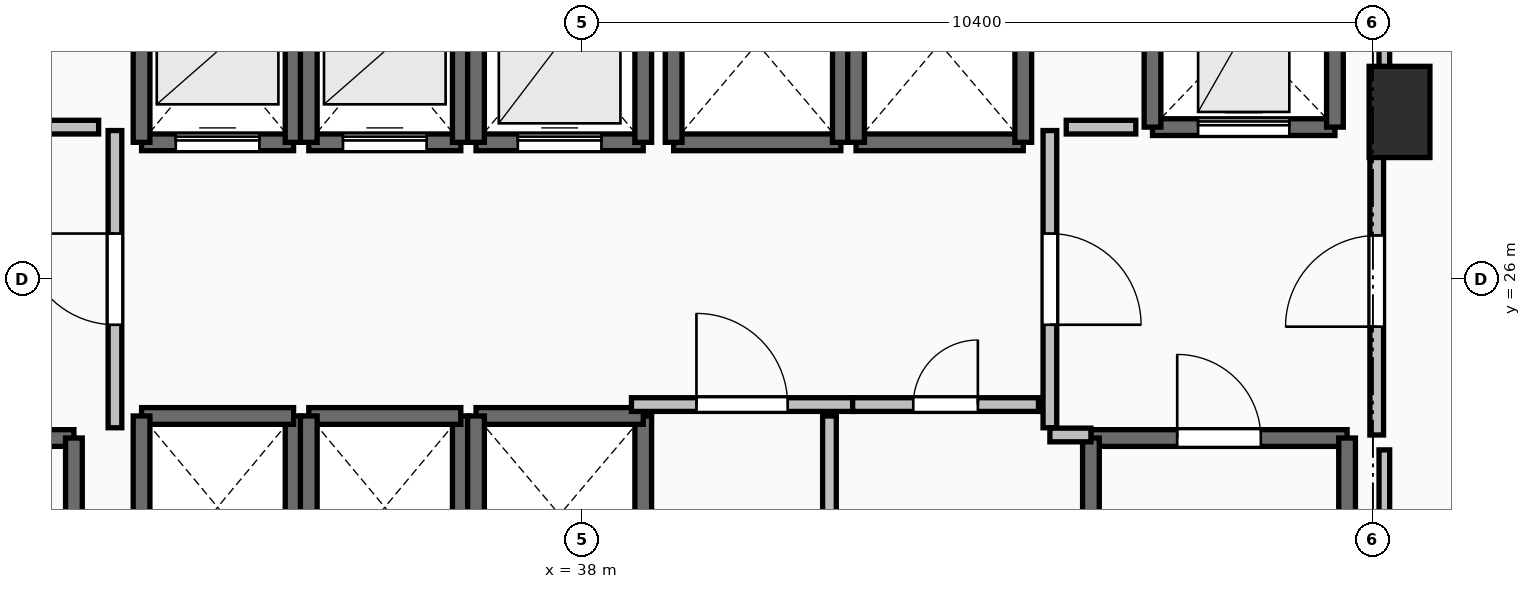
"""IFC4 building model, lengths in metres.
Left out: names, types, materials, properties, quantities, classifications, styles, units other than length and angle.
Written with IfcOpenShell. Run it as: python <this file> out.ifc"""

import sys

from ifc_helpers import new_model, si_unit, direction, frame, frame_2d, origin, origin_2d, place, context, subcontext, project, spatial, rectangle, extrude, element, fill, save


model = new_model("IFC4")
c1 = context("Model", 3, precision=1e-05, world=origin(), true_north=direction((0.0, 1.0)))
c2 = subcontext(c1, "Body", "Model", "MODEL_VIEW")
j1 = project(units=[si_unit("LENGTHUNIT", "METRE"), si_unit("PLANEANGLEUNIT", "RADIAN")], contexts=[c1])
p1 = place(None, origin())
s1 = spatial("IfcSite", under=j1, at=p1, CompositionType="ELEMENT")
p2 = place(p1, origin())
s2 = spatial("IfcBuilding", under=s1, at=p2, CompositionType="ELEMENT")
p3 = place(p2, frame((0.0, 0.0, 62.5)))
s3 = spatial("IfcBuildingStorey", under=s2, at=p3, CompositionType="ELEMENT", Elevation=62.5)
p4 = place(p3, frame((48.75, 28.2, 0.0), z_axis=(0.0, 0.0, 1.0), x_axis=(1.0, 0.0, 0.0)))
e1 = element("IfcColumn", 1, at=p4, inside=s3, PredefinedType="PILASTER", context=c2, shape_type="SweptSolid", body=[
    extrude(rectangle(XDim=0.8, YDim=1.2, at=origin_2d()), origin(), (0.0, 0.0, 1.0), 3.5),
])
p5 = place(p3, frame((27.94, 23.91, 0.0), z_axis=(0.0, 0.0, 1.0), x_axis=(1.0, 0.0, 0.0)))
e2 = element("IfcWall", 2, at=p5, inside=s3, PredefinedType="SOLIDWALL", context=c2, shape_type="SweptSolid", body=[
    extrude(rectangle(XDim=3.37, YDim=0.22, at=frame_2d((1.685, 0.0))), origin(), (0.0, 0.0, 1.0), 3.24),
])
p6 = place(p5, frame((1.135, 0.0, 0.0)))
e3 = element("IfcOpeningElement", 3, at=p6, cuts=e2, PredefinedType="OPENING", context=c2, shape_type="SweptSolid", body=[
    extrude(rectangle(XDim=1.1, YDim=2.15, at=frame_2d((0.55, 1.075))), frame((0.0, 0.125, 0.0), z_axis=(0.0, -1.0, 0.0), x_axis=(1.0, 0.0, 0.0)), (0.0, 0.0, 1.0), 0.25),
])
p7 = place(p3, frame((31.31, 23.91, 0.0), z_axis=(0.0, 0.0, 1.0), x_axis=(0.0, -1.0, 0.0)))
e4 = element("IfcWall", 4, at=p7, inside=s3, PredefinedType="SOLIDWALL", context=c2, shape_type="SweptSolid", body=[
    extrude(rectangle(XDim=7.42, YDim=0.22, at=frame_2d((3.71, 0.0))), origin(), (0.0, 0.0, 1.0), 3.24),
])
p8 = place(p3, frame((44.69, 23.91, 0.0), z_axis=(0.0, 0.0, 1.0), x_axis=(1.0, 0.0, 0.0)))
e5 = element("IfcWall", 5, at=p8, inside=s3, PredefinedType="SOLIDWALL", context=c2, shape_type="SweptSolid", body=[
    extrude(rectangle(XDim=3.37, YDim=0.22, at=frame_2d((1.685, 0.0))), origin(), (0.0, 0.0, 1.0), 3.24),
])
p9 = place(p8, frame((1.135, 0.0, 0.0)))
e6 = element("IfcOpeningElement", 6, at=p9, cuts=e5, PredefinedType="OPENING", context=c2, shape_type="SweptSolid", body=[
    extrude(rectangle(XDim=1.1, YDim=2.15, at=frame_2d((0.55, 1.075))), frame((0.0, 0.125, 0.0), z_axis=(0.0, -1.0, 0.0), x_axis=(1.0, 0.0, 0.0)), (0.0, 0.0, 1.0), 0.25),
])
for number, where, z_axis, x_axis in (
    (7, (48.06, 23.91, 0.0), (0.0, 0.0, 1.0), (0.0, -1.0, 0.0)),
    (8, (44.69, 16.49, 0.0), (0.0, 0.0, 1.0), (0.0, 1.0, 0.0)),
):
    element("IfcWall", number, at=place(p3, frame(where, z_axis=z_axis, x_axis=x_axis)), inside=s3, PredefinedType="SOLIDWALL", context=c2, shape_type="SweptSolid", body=[
        extrude(rectangle(XDim=7.42, YDim=0.22, at=frame_2d((3.71, 0.0))), origin(), (0.0, 0.0, 1.0), 3.24),
    ])
p10 = place(p3, frame((32.2, 27.8, 0.0), z_axis=(0.0, 0.0, 1.0), x_axis=(1.0, 0.0, 0.0)))
e9 = element("IfcWall", 9, at=p10, inside=s3, PredefinedType="SOLIDWALL", context=c2, shape_type="SweptSolid", body=[
    extrude(rectangle(XDim=2.0, YDim=0.22, at=frame_2d((1.0, 0.0))), origin(), (0.0, 0.0, 1.0), 3.24),
])
p11 = place(p10, frame((0.45, 0.0, 0.0)))
e10 = element("IfcOpeningElement", 10, at=p11, cuts=e9, PredefinedType="OPENING", context=c2, shape_type="SweptSolid", body=[
    extrude(rectangle(XDim=1.1, YDim=2.2, at=frame_2d((0.55, 1.1))), frame((0.0, 0.125, 0.0), z_axis=(0.0, -1.0, 0.0), x_axis=(1.0, 0.0, 0.0)), (0.0, 0.0, 1.0), 0.25),
])
for number, where, z_axis, x_axis in (
    (11, (34.2, 27.8, 0.0), (0.0, 0.0, 1.0), (0.0, 1.0, 0.0)),
    (12, (32.2, 30.2, 0.0), (0.0, 0.0, 1.0), (0.0, -1.0, 0.0)),
):
    element("IfcWall", number, at=place(p3, frame(where, z_axis=z_axis, x_axis=x_axis)), inside=s3, PredefinedType="SOLIDWALL", context=c2, shape_type="SweptSolid", body=[
        extrude(rectangle(XDim=2.4, YDim=0.22, at=frame_2d((1.2, 0.0))), origin(), (0.0, 0.0, 1.0), 3.24),
    ])
p12 = place(p3, frame((34.4, 27.8, 0.0), z_axis=(0.0, 0.0, 1.0), x_axis=(1.0, 0.0, 0.0)))
e13 = element("IfcWall", 13, at=p12, inside=s3, PredefinedType="SOLIDWALL", context=c2, shape_type="SweptSolid", body=[
    extrude(rectangle(XDim=2.0, YDim=0.22, at=frame_2d((1.0, 0.0))), origin(), (0.0, 0.0, 1.0), 3.24),
])
p13 = place(p12, frame((0.45, 0.0, 0.0)))
e14 = element("IfcOpeningElement", 14, at=p13, cuts=e13, PredefinedType="OPENING", context=c2, shape_type="SweptSolid", body=[
    extrude(rectangle(XDim=1.1, YDim=2.2, at=frame_2d((0.55, 1.1))), frame((0.0, 0.125, 0.0), z_axis=(0.0, -1.0, 0.0), x_axis=(1.0, 0.0, 0.0)), (0.0, 0.0, 1.0), 0.25),
])
for number, where, z_axis, x_axis in (
    (15, (36.4, 27.8, 0.0), (0.0, 0.0, 1.0), (0.0, 1.0, 0.0)),
    (16, (34.4, 30.2, 0.0), (0.0, 0.0, 1.0), (0.0, -1.0, 0.0)),
):
    element("IfcWall", number, at=place(p3, frame(where, z_axis=z_axis, x_axis=x_axis)), inside=s3, PredefinedType="SOLIDWALL", context=c2, shape_type="SweptSolid", body=[
        extrude(rectangle(XDim=2.4, YDim=0.22, at=frame_2d((1.2, 0.0))), origin(), (0.0, 0.0, 1.0), 3.24),
    ])
p14 = place(p3, frame((36.6, 27.8, 0.0), z_axis=(0.0, 0.0, 1.0), x_axis=(1.0, 0.0, 0.0)))
e17 = element("IfcWall", 17, at=p14, inside=s3, PredefinedType="SOLIDWALL", context=c2, shape_type="SweptSolid", body=[
    extrude(rectangle(XDim=2.2, YDim=0.22, at=frame_2d((1.1, 0.0))), origin(), (0.0, 0.0, 1.0), 3.24),
])
p15 = place(p14, frame((0.55, 0.0, 0.0)))
e18 = element("IfcOpeningElement", 18, at=p15, cuts=e17, PredefinedType="OPENING", context=c2, shape_type="SweptSolid", body=[
    extrude(rectangle(XDim=1.1, YDim=2.2, at=frame_2d((0.55, 1.1))), frame((0.0, 0.125, 0.0), z_axis=(0.0, -1.0, 0.0), x_axis=(1.0, 0.0, 0.0)), (0.0, 0.0, 1.0), 0.25),
])
for number, where, z_axis, x_axis in (
    (19, (38.8, 27.8, 0.0), (0.0, 0.0, 1.0), (0.0, 1.0, 0.0)),
    (20, (36.6, 30.4, 0.0), (0.0, 0.0, 1.0), (0.0, -1.0, 0.0)),
):
    element("IfcWall", number, at=place(p3, frame(where, z_axis=z_axis, x_axis=x_axis)), inside=s3, PredefinedType="SOLIDWALL", context=c2, shape_type="SweptSolid", body=[
        extrude(rectangle(XDim=2.6, YDim=0.22, at=frame_2d((1.3, 0.0))), origin(), (0.0, 0.0, 1.0), 3.24),
    ])
p16 = place(p3, frame((34.2, 21.8, 0.0), z_axis=(0.0, 0.0, 1.0), x_axis=(0.0, 1.0, 0.0)))
e21 = element("IfcWall", 21, at=p16, inside=s3, PredefinedType="SOLIDWALL", context=c2, shape_type="SweptSolid", body=[
    extrude(rectangle(XDim=2.4, YDim=0.22, at=frame_2d((1.2, 0.0))), origin(), (0.0, 0.0, 1.0), 3.24),
])
p17 = place(p3, frame((34.2, 24.2, 0.0), z_axis=(0.0, 0.0, 1.0), x_axis=(-1.0, 0.0, 0.0)))
e22 = element("IfcWall", 22, at=p17, inside=s3, PredefinedType="SOLIDWALL", context=c2, shape_type="SweptSolid", body=[
    extrude(rectangle(XDim=2.0, YDim=0.22, at=frame_2d((1.0, 0.0))), origin(), (0.0, 0.0, 1.0), 3.24),
])
for number, where, z_axis, x_axis in (
    (23, (32.2, 24.2, 0.0), (0.0, 0.0, 1.0), (0.0, -1.0, 0.0)),
    (24, (36.4, 21.8, 0.0), (0.0, 0.0, 1.0), (0.0, 1.0, 0.0)),
):
    element("IfcWall", number, at=place(p3, frame(where, z_axis=z_axis, x_axis=x_axis)), inside=s3, PredefinedType="SOLIDWALL", context=c2, shape_type="SweptSolid", body=[
        extrude(rectangle(XDim=2.4, YDim=0.22, at=frame_2d((1.2, 0.0))), origin(), (0.0, 0.0, 1.0), 3.24),
    ])
p18 = place(p3, frame((36.4, 24.2, 0.0), z_axis=(0.0, 0.0, 1.0), x_axis=(-1.0, 0.0, 0.0)))
e25 = element("IfcWall", 25, at=p18, inside=s3, PredefinedType="SOLIDWALL", context=c2, shape_type="SweptSolid", body=[
    extrude(rectangle(XDim=2.0, YDim=0.22, at=frame_2d((1.0, 0.0))), origin(), (0.0, 0.0, 1.0), 3.24),
])
p19 = place(p3, frame((34.4, 24.2, 0.0), z_axis=(0.0, 0.0, 1.0), x_axis=(0.0, -1.0, 0.0)))
e26 = element("IfcWall", 26, at=p19, inside=s3, PredefinedType="SOLIDWALL", context=c2, shape_type="SweptSolid", body=[
    extrude(rectangle(XDim=2.4, YDim=0.22, at=frame_2d((1.2, 0.0))), origin(), (0.0, 0.0, 1.0), 3.24),
])
p20 = place(p3, frame((38.8, 21.6, 0.0), z_axis=(0.0, 0.0, 1.0), x_axis=(0.0, 1.0, 0.0)))
e27 = element("IfcWall", 27, at=p20, inside=s3, PredefinedType="SOLIDWALL", context=c2, shape_type="SweptSolid", body=[
    extrude(rectangle(XDim=2.6, YDim=0.22, at=frame_2d((1.3, 0.0))), origin(), (0.0, 0.0, 1.0), 3.24),
])
p21 = place(p3, frame((38.8, 24.2, 0.0), z_axis=(0.0, 0.0, 1.0), x_axis=(-1.0, 0.0, 0.0)))
e28 = element("IfcWall", 28, at=p21, inside=s3, PredefinedType="SOLIDWALL", context=c2, shape_type="SweptSolid", body=[
    extrude(rectangle(XDim=2.2, YDim=0.22, at=frame_2d((1.1, 0.0))), origin(), (0.0, 0.0, 1.0), 3.24),
])
p22 = place(p3, frame((36.6, 24.2, 0.0), z_axis=(0.0, 0.0, 1.0), x_axis=(0.0, -1.0, 0.0)))
e29 = element("IfcWall", 29, at=p22, inside=s3, PredefinedType="SOLIDWALL", context=c2, shape_type="SweptSolid", body=[
    extrude(rectangle(XDim=2.6, YDim=0.22, at=frame_2d((1.3, 0.0))), origin(), (0.0, 0.0, 1.0), 3.24),
])
p23 = place(p3, frame((39.2, 27.8, 0.0), z_axis=(0.0, 0.0, 1.0), x_axis=(1.0, 0.0, 0.0)))
e30 = element("IfcWall", 30, at=p23, inside=s3, PredefinedType="SOLIDWALL", context=c2, shape_type="SweptSolid", body=[
    extrude(rectangle(XDim=2.2, YDim=0.22, at=frame_2d((1.1, 0.0))), origin(), (0.0, 0.0, 1.0), 3.24),
])
for number, where, z_axis, x_axis in (
    (31, (41.4, 27.8, 0.0), (0.0, 0.0, 1.0), (0.0, 1.0, 0.0)),
    (32, (39.2, 30.4, 0.0), (0.0, 0.0, 1.0), (0.0, -1.0, 0.0)),
):
    element("IfcWall", number, at=place(p3, frame(where, z_axis=z_axis, x_axis=x_axis)), inside=s3, PredefinedType="SOLIDWALL", context=c2, shape_type="SweptSolid", body=[
        extrude(rectangle(XDim=2.6, YDim=0.22, at=frame_2d((1.3, 0.0))), origin(), (0.0, 0.0, 1.0), 3.24),
    ])
p24 = place(p3, frame((41.6, 27.8, 0.0), z_axis=(0.0, 0.0, 1.0), x_axis=(1.0, 0.0, 0.0)))
e33 = element("IfcWall", 33, at=p24, inside=s3, PredefinedType="SOLIDWALL", context=c2, shape_type="SweptSolid", body=[
    extrude(rectangle(XDim=2.2, YDim=0.22, at=frame_2d((1.1, 0.0))), origin(), (0.0, 0.0, 1.0), 3.24),
])
for number, where, z_axis, x_axis in (
    (34, (43.8, 27.8, 0.0), (0.0, 0.0, 1.0), (0.0, 1.0, 0.0)),
    (35, (41.6, 30.4, 0.0), (0.0, 0.0, 1.0), (0.0, -1.0, 0.0)),
):
    element("IfcWall", number, at=place(p3, frame(where, z_axis=z_axis, x_axis=x_axis)), inside=s3, PredefinedType="SOLIDWALL", context=c2, shape_type="SweptSolid", body=[
        extrude(rectangle(XDim=2.6, YDim=0.22, at=frame_2d((1.3, 0.0))), origin(), (0.0, 0.0, 1.0), 3.24),
    ])
p25 = place(p3, frame((45.5, 28.0, 0.0), z_axis=(0.0, 0.0, 1.0), x_axis=(1.0, 0.0, 0.0)))
e36 = element("IfcWall", 36, at=p25, inside=s3, PredefinedType="SHEAR", context=c2, shape_type="SweptSolid", body=[
    extrude(rectangle(XDim=2.4, YDim=0.22, at=frame_2d((1.2, 0.0))), origin(), (0.0, 0.0, 1.0), 3.24),
])
p26 = place(p25, frame((0.6, 0.0, 0.0)))
e37 = element("IfcOpeningElement", 37, at=p26, cuts=e36, PredefinedType="OPENING", context=c2, shape_type="SweptSolid", body=[
    extrude(rectangle(XDim=1.2, YDim=2.2, at=frame_2d((0.6, 1.1))), frame((0.0, 0.125, 0.0), z_axis=(0.0, -1.0, 0.0), x_axis=(1.0, 0.0, 0.0)), (0.0, 0.0, 1.0), 0.25),
])
for number, where, z_axis, x_axis in (
    (38, (47.9, 28.0, 0.0), (0.0, 0.0, 1.0), (0.0, 1.0, 0.0)),
    (39, (45.5, 30.5, 0.0), (0.0, 0.0, 1.0), (0.0, -1.0, 0.0)),
):
    element("IfcWall", number, at=place(p3, frame(where, z_axis=z_axis, x_axis=x_axis)), inside=s3, PredefinedType="SHEAR", context=c2, shape_type="SweptSolid", body=[
        extrude(rectangle(XDim=2.5, YDim=0.22, at=frame_2d((1.25, 0.0))), origin(), (0.0, 0.0, 1.0), 3.24),
    ])
p27 = place(p3, frame((31.85, 24.045, 0.0), z_axis=(0.0, 0.0, 1.0), x_axis=(0.0, 1.0, 0.0)))
e40 = element("IfcWall", 40, at=p27, inside=s3, PredefinedType="PARTITIONING", context=c2, shape_type="SweptSolid", body=[
    extrude(rectangle(XDim=3.91, YDim=0.18, at=frame_2d((1.955, 0.0))), origin(), (0.0, 0.0, 1.0), 3.24),
])
p28 = place(p27, frame((1.355, 0.0, 0.0)))
e41 = element("IfcOpeningElement", 41, at=p28, cuts=e40, PredefinedType="OPENING", context=c2, shape_type="SweptSolid", body=[
    extrude(rectangle(XDim=1.2, YDim=2.15, at=frame_2d((0.6, 1.075))), frame((0.0, 0.105, 0.0), z_axis=(0.0, -1.0, 0.0), x_axis=(1.0, 0.0, 0.0)), (0.0, 0.0, 1.0), 0.21),
])
p29 = place(p3, frame((44.15, 27.955, 0.0), z_axis=(0.0, 0.0, 1.0), x_axis=(0.0, -1.0, 0.0)))
e42 = element("IfcWall", 42, at=p29, inside=s3, PredefinedType="PARTITIONING", context=c2, shape_type="SweptSolid", body=[
    extrude(rectangle(XDim=3.91, YDim=0.18, at=frame_2d((1.955, 0.0))), origin(), (0.0, 0.0, 1.0), 3.24),
])
p30 = place(p29, frame((1.355, 0.0, 0.0)))
e43 = element("IfcOpeningElement", 43, at=p30, cuts=e42, PredefinedType="OPENING", context=c2, shape_type="SweptSolid", body=[
    extrude(rectangle(XDim=1.2, YDim=2.15, at=frame_2d((0.6, 1.075))), frame((0.0, 0.105, 0.0), z_axis=(0.0, -1.0, 0.0), x_axis=(1.0, 0.0, 0.0)), (0.0, 0.0, 1.0), 0.21),
])
p31 = place(p3, frame((44.15, 23.95, 0.0), z_axis=(0.0, 0.0, 1.0), x_axis=(1.0, 0.0, 0.0)))
e44 = element("IfcWall", 44, at=p31, inside=s3, PredefinedType="PARTITIONING", context=c2, shape_type="SweptSolid", body=[
    extrude(rectangle(XDim=0.54, YDim=0.18, at=frame_2d((0.27, 0.0))), origin(), (0.0, 0.0, 1.0), 3.24),
])
p32 = place(p3, frame((48.45, 23.95, 0.0), z_axis=(0.0, 0.0, 1.0), x_axis=(0.0, 1.0, 0.0)))
e45 = element("IfcWall", 45, at=p32, inside=s3, PredefinedType="PARTITIONING", context=c2, shape_type="SweptSolid", body=[
    extrude(rectangle(XDim=4.05, YDim=0.18, at=frame_2d((2.025, 0.0))), origin(), (0.0, 0.0, 1.0), 3.24),
])
p33 = place(p32, frame((1.425, 0.0, 0.0)))
e46 = element("IfcOpeningElement", 46, at=p33, cuts=e45, PredefinedType="OPENING", context=c2, shape_type="SweptSolid", body=[
    extrude(rectangle(XDim=1.2, YDim=2.15, at=frame_2d((0.6, 1.075))), frame((0.0, 0.105, 0.0), z_axis=(0.0, -1.0, 0.0), x_axis=(1.0, 0.0, 0.0)), (0.0, 0.0, 1.0), 0.21),
])
p34 = place(p3, frame((38.645, 24.35, 0.0), z_axis=(0.0, 0.0, 1.0), x_axis=(1.0, 0.0, 0.0)))
e47 = element("IfcWall", 47, at=p34, inside=s3, PredefinedType="PARTITIONING", context=c2, shape_type="SweptSolid", body=[
    extrude(rectangle(XDim=2.91, YDim=0.18, at=frame_2d((1.455, 0.0))), origin(), (0.0, 0.0, 1.0), 3.24),
])
p35 = place(p34, frame((0.855, 0.0, 0.0)))
e48 = element("IfcOpeningElement", 48, at=p35, cuts=e47, PredefinedType="OPENING", context=c2, shape_type="SweptSolid", body=[
    extrude(rectangle(XDim=1.2, YDim=2.15, at=frame_2d((0.6, 1.075))), frame((0.0, 0.105, 0.0), z_axis=(0.0, -1.0, 0.0), x_axis=(1.0, 0.0, 0.0)), (0.0, 0.0, 1.0), 0.21),
])
p36 = place(p3, frame((41.555, 24.35, 0.0), z_axis=(0.0, 0.0, 1.0), x_axis=(1.0, 0.0, 0.0)))
e49 = element("IfcWall", 49, at=p36, inside=s3, PredefinedType="PARTITIONING", context=c2, shape_type="SweptSolid", body=[
    extrude(rectangle(XDim=2.445, YDim=0.18, at=frame_2d((1.223, 0.0))), origin(), (0.0, 0.0, 1.0), 3.24),
])
p37 = place(p36, frame((0.798, 0.0, 0.0)))
e50 = element("IfcOpeningElement", 50, at=p37, cuts=e49, PredefinedType="OPENING", context=c2, shape_type="SweptSolid", body=[
    extrude(rectangle(XDim=0.85, YDim=2.1, at=frame_2d((0.425, 1.05))), frame((0.0, 0.105, 0.0), z_axis=(0.0, -1.0, 0.0), x_axis=(1.0, 0.0, 0.0)), (0.0, 0.0, 1.0), 0.21),
])
p38 = place(p3, frame((41.25, 20.305, 0.0), z_axis=(0.0, 0.0, 1.0), x_axis=(0.0, 1.0, 0.0)))
e51 = element("IfcWall", 51, at=p38, inside=s3, PredefinedType="PARTITIONING", context=c2, shape_type="SweptSolid", body=[
    extrude(rectangle(XDim=3.895, YDim=0.18, at=frame_2d((1.948, 0.0))), origin(), (0.0, 0.0, 1.0), 3.24),
])
p39 = place(p38, frame((1.522, 0.0, 0.0)))
e52 = element("IfcOpeningElement", 52, at=p39, cuts=e51, PredefinedType="OPENING", context=c2, shape_type="SweptSolid", body=[
    extrude(rectangle(XDim=0.85, YDim=2.1, at=frame_2d((0.425, 1.05))), frame((0.0, 0.105, 0.0), z_axis=(0.0, -1.0, 0.0), x_axis=(1.0, 0.0, 0.0)), (0.0, 0.0, 1.0), 0.21),
])
for number, where, z_axis, x_axis in (
    (53, (31.635, 28.0, 0.0), (0.0, 0.0, 1.0), (-1.0, 0.0, 0.0)),
    (54, (45.28, 28.0, 0.0), (0.0, 0.0, 1.0), (-1.0, 0.0, 0.0)),
):
    element("IfcWall", number, at=place(p3, frame(where, z_axis=z_axis, x_axis=x_axis)), inside=s3, PredefinedType="PARTITIONING", context=c2, shape_type="SweptSolid", body=[
        extrude(rectangle(XDim=0.915, YDim=0.18, at=frame_2d((0.458, 0.0))), origin(), (0.0, 0.0, 1.0), 3.24),
    ])
p40 = place(p3, frame((48.55, 33.45, 0.0), z_axis=(0.0, 0.0, 1.0), x_axis=(0.0, -1.0, 0.0)))
e55 = element("IfcWall", 55, at=p40, inside=s3, PredefinedType="PARTITIONING", context=c2, shape_type="SweptSolid", body=[
    extrude(rectangle(XDim=5.254, YDim=0.14, at=frame_2d((2.627, 0.0))), origin(), (0.0, 0.0, 1.0), 2.432),
])
p41 = place(p3, frame((48.55, 23.754, 0.0), z_axis=(0.0, 0.0, 1.0), x_axis=(0.0, -1.0, 0.0)))
e56 = element("IfcWall", 56, at=p41, inside=s3, PredefinedType="PARTITIONING", context=c2, shape_type="SweptSolid", body=[
    extrude(rectangle(XDim=7.514, YDim=0.14, at=frame_2d((3.757, 0.0))), origin(), (0.0, 0.0, 1.0), 2.432),
])
p42 = place(p9, origin())
e57 = element("IfcDoor", 57, at=p42, inside=s3, OperationType="SINGLE_SWING_LEFT", PredefinedType="DOOR", context=c2, shape_type="SweptSolid", body=[
    extrude(rectangle(XDim=1.1, YDim=2.15, at=frame_2d((0.55, 1.075))), frame((0.0, 0.025, 0.0), z_axis=(0.0, -1.0, 0.0), x_axis=(1.0, 0.0, 0.0)), (0.0, 0.0, 1.0), 0.05),
])
fill(e6, e57)
p43 = place(p11, origin())
e58 = element("IfcDoor", 58, at=p43, inside=s3, OperationType="SLIDING_TO_LEFT", PredefinedType="DOOR", context=c2, shape_type="SweptSolid", body=[
    extrude(rectangle(XDim=1.1, YDim=2.2, at=frame_2d((0.55, 1.1))), frame((0.0, 0.025, 0.0), z_axis=(0.0, -1.0, 0.0), x_axis=(1.0, 0.0, 0.0)), (0.0, 0.0, 1.0), 0.05),
])
fill(e10, e58)
p44 = place(p13, origin())
e59 = element("IfcDoor", 59, at=p44, inside=s3, OperationType="SLIDING_TO_LEFT", PredefinedType="DOOR", context=c2, shape_type="SweptSolid", body=[
    extrude(rectangle(XDim=1.1, YDim=2.2, at=frame_2d((0.55, 1.1))), frame((0.0, 0.025, 0.0), z_axis=(0.0, -1.0, 0.0), x_axis=(1.0, 0.0, 0.0)), (0.0, 0.0, 1.0), 0.05),
])
fill(e14, e59)
p45 = place(p15, origin())
e60 = element("IfcDoor", 60, at=p45, inside=s3, OperationType="SLIDING_TO_LEFT", PredefinedType="DOOR", context=c2, shape_type="SweptSolid", body=[
    extrude(rectangle(XDim=1.1, YDim=2.2, at=frame_2d((0.55, 1.1))), frame((0.0, 0.025, 0.0), z_axis=(0.0, -1.0, 0.0), x_axis=(1.0, 0.0, 0.0)), (0.0, 0.0, 1.0), 0.05),
])
fill(e18, e60)
p46 = place(p26, origin())
e61 = element("IfcDoor", 61, at=p46, inside=s3, OperationType="SLIDING_TO_LEFT", PredefinedType="DOOR", context=c2, shape_type="SweptSolid", body=[
    extrude(rectangle(XDim=1.2, YDim=2.2, at=frame_2d((0.6, 1.1))), frame((0.0, 0.025, 0.0), z_axis=(0.0, -1.0, 0.0), x_axis=(1.0, 0.0, 0.0)), (0.0, 0.0, 1.0), 0.05),
])
fill(e37, e61)
p47 = place(p28, origin())
e62 = element("IfcDoor", 62, at=p47, inside=s3, OperationType="SINGLE_SWING_RIGHT", PredefinedType="DOOR", context=c2, shape_type="SweptSolid", body=[
    extrude(rectangle(XDim=1.2, YDim=2.15, at=frame_2d((0.6, 1.075))), frame((0.0, 0.025, 0.0), z_axis=(0.0, -1.0, 0.0), x_axis=(1.0, 0.0, 0.0)), (0.0, 0.0, 1.0), 0.05),
])
fill(e41, e62)
p48 = place(p30, origin())
e63 = element("IfcDoor", 63, at=p48, inside=s3, OperationType="SINGLE_SWING_RIGHT", PredefinedType="DOOR", context=c2, shape_type="SweptSolid", body=[
    extrude(rectangle(XDim=1.2, YDim=2.15, at=frame_2d((0.6, 1.075))), frame((0.0, 0.025, 0.0), z_axis=(0.0, -1.0, 0.0), x_axis=(1.0, 0.0, 0.0)), (0.0, 0.0, 1.0), 0.05),
])
fill(e43, e63)
p49 = place(p33, origin())
e64 = element("IfcDoor", 64, at=p49, inside=s3, OperationType="SINGLE_SWING_LEFT", PredefinedType="DOOR", context=c2, shape_type="SweptSolid", body=[
    extrude(rectangle(XDim=1.2, YDim=2.15, at=frame_2d((0.6, 1.075))), frame((0.0, 0.025, 0.0), z_axis=(0.0, -1.0, 0.0), x_axis=(1.0, 0.0, 0.0)), (0.0, 0.0, 1.0), 0.05),
])
fill(e46, e64)
p50 = place(p35, origin())
e65 = element("IfcDoor", 65, at=p50, inside=s3, OperationType="SINGLE_SWING_LEFT", PredefinedType="DOOR", context=c2, shape_type="SweptSolid", body=[
    extrude(rectangle(XDim=1.2, YDim=2.15, at=frame_2d((0.6, 1.075))), frame((0.0, 0.025, 0.0), z_axis=(0.0, -1.0, 0.0), x_axis=(1.0, 0.0, 0.0)), (0.0, 0.0, 1.0), 0.05),
])
fill(e48, e65)
p51 = place(p37, origin())
e66 = element("IfcDoor", 66, at=p51, inside=s3, OperationType="SINGLE_SWING_RIGHT", PredefinedType="DOOR", context=c2, shape_type="SweptSolid", body=[
    extrude(rectangle(XDim=0.85, YDim=2.1, at=frame_2d((0.425, 1.05))), frame((0.0, 0.025, 0.0), z_axis=(0.0, -1.0, 0.0), x_axis=(1.0, 0.0, 0.0)), (0.0, 0.0, 1.0), 0.05),
])
fill(e50, e66)
save(model, sys.argv[1])
